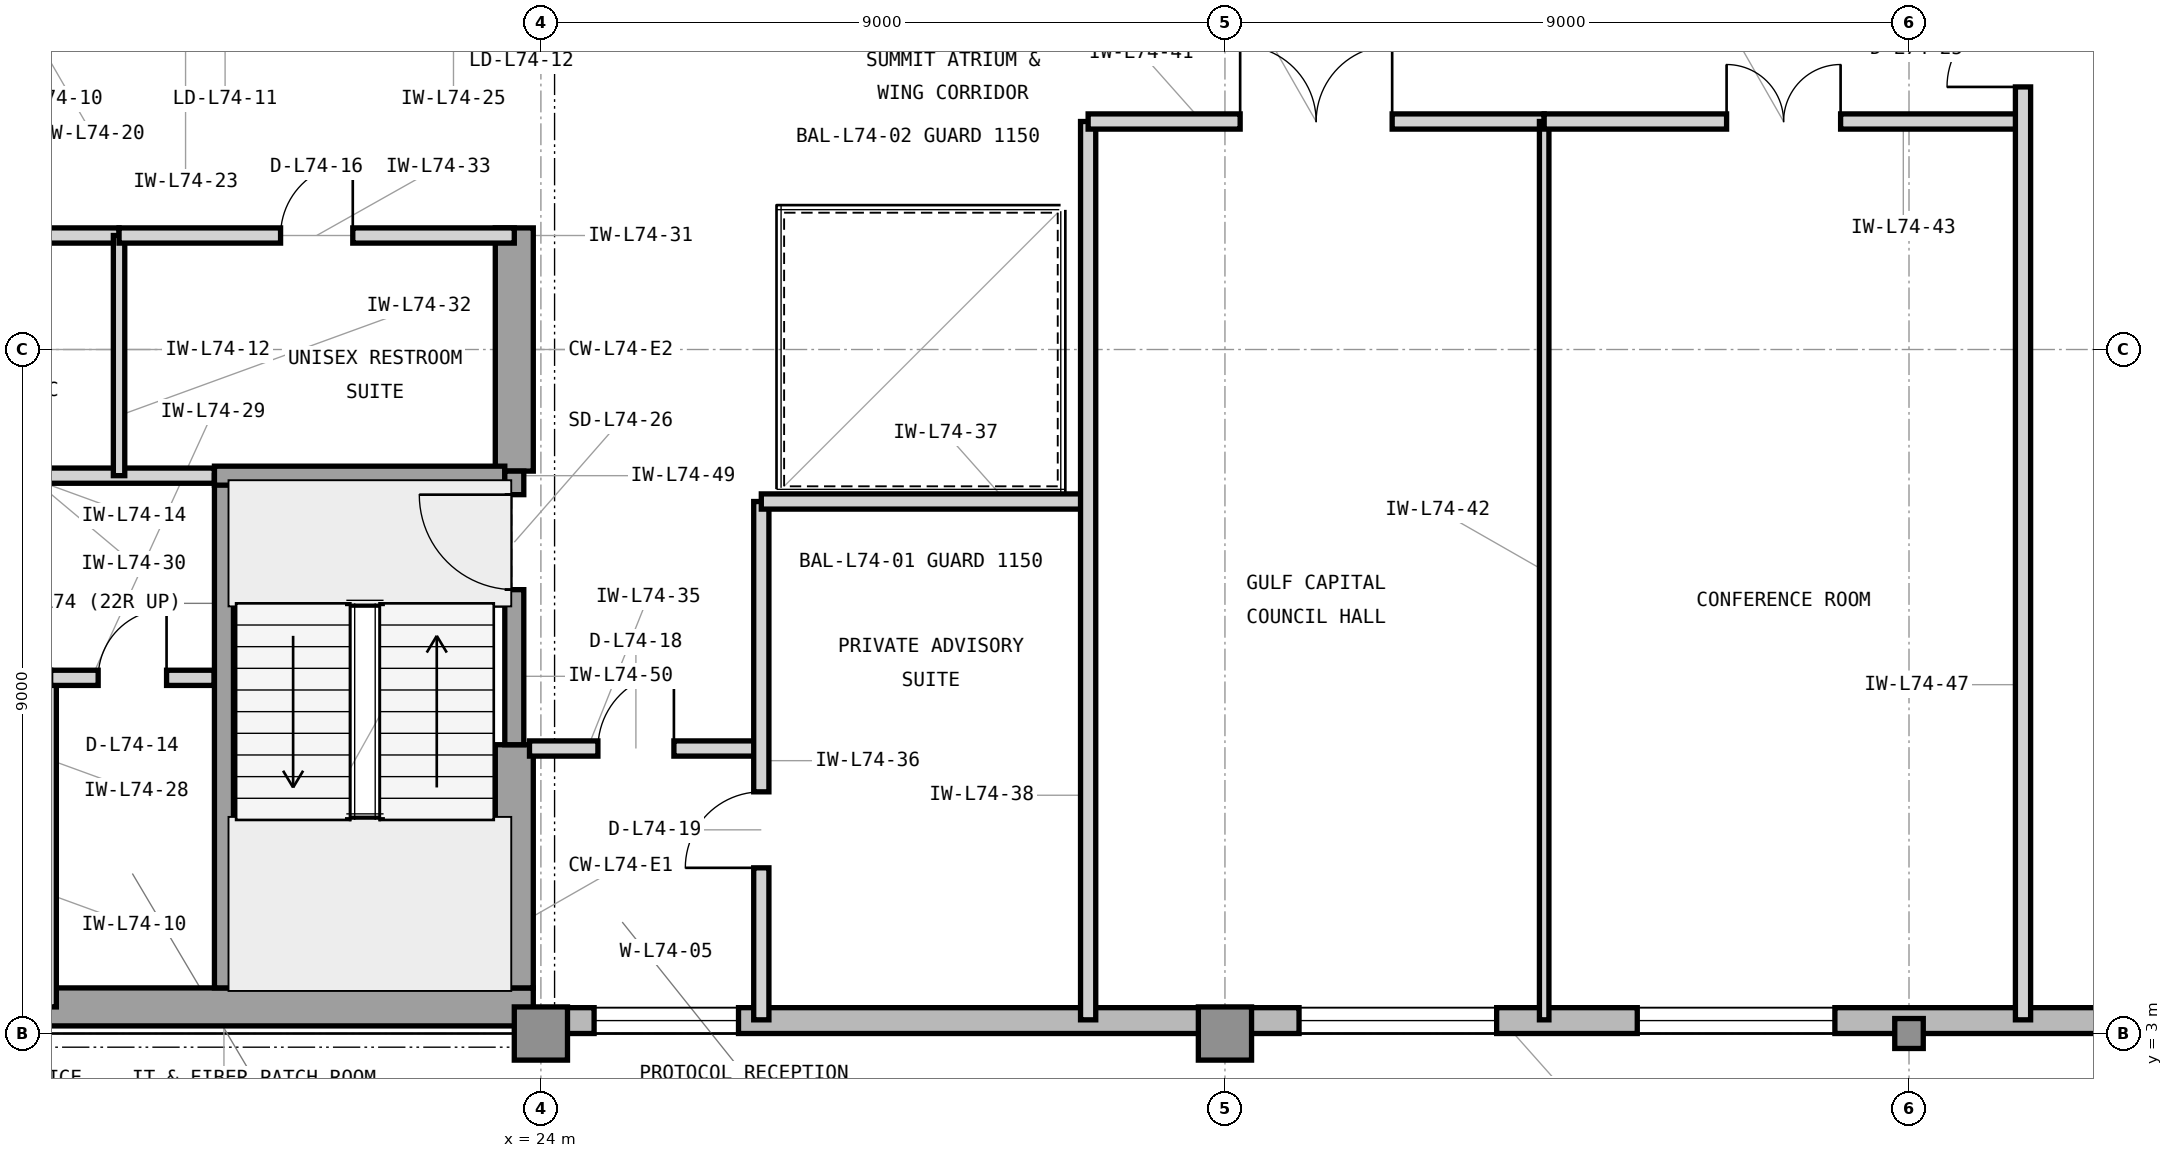
"""IFC4 building model, lengths in metres.
Left out: names, types, materials, properties, quantities, classifications, styles, units other than length and angle.
Written with IfcOpenShell. Run it as: python <this file> out.ifc"""

import sys

from ifc_helpers import new_model, si_unit, direction, frame, frame_2d, origin, origin_2d, place, context, subcontext, project, spatial, rectangle, i_section, extrude, element, fill, save


model = new_model("IFC4")
c1 = context("Model", 3, precision=1e-05, world=origin(), true_north=direction((0.0, 1.0)))
c2 = subcontext(c1, "Body", "Model", "MODEL_VIEW")
j1 = project(units=[si_unit("LENGTHUNIT", "METRE"), si_unit("PLANEANGLEUNIT", "RADIAN")], contexts=[c1])
p1 = place(None, origin())
s1 = spatial("IfcSite", under=j1, at=p1, CompositionType="ELEMENT")
p2 = place(p1, origin())
s2 = spatial("IfcBuilding", under=s1, at=p2, CompositionType="ELEMENT")
p3 = place(p2, frame((0.0, 0.0, 301.5)))
s3 = spatial("IfcBuildingStorey", under=s2, at=p3, CompositionType="ELEMENT", Elevation=301.5)
p4 = place(p3, frame((7.475, 3.35, 0.0), z_axis=(0.0, 0.0, 1.0), x_axis=(1.0, 0.0, 0.0)))
e1 = element("IfcWall", 1, at=p4, inside=s3, PredefinedType="SHEAR", context=c2, shape_type="SweptSolid", body=[
    extrude(rectangle(XDim=16.425, YDim=0.5, at=frame_2d((8.212, 0.0))), origin(), (0.0, 0.0, 1.0), 3.9),
])
p5 = place(p3, frame((23.65, 3.6, 0.0), z_axis=(0.0, 0.0, 1.0), x_axis=(0.0, 1.0, 0.0)))
e2 = element("IfcWall", 2, at=p5, inside=s3, PredefinedType="SHEAR", context=c2, shape_type="SweptSolid", body=[
    extrude(rectangle(XDim=3.2, YDim=0.5, at=frame_2d((1.6, 0.0))), origin(), (0.0, 0.0, 1.0), 3.9),
])
p6 = place(p3, frame((23.65, 10.4, 0.0), z_axis=(0.0, 0.0, 1.0), x_axis=(0.0, 1.0, 0.0)))
e3 = element("IfcWall", 3, at=p6, inside=s3, PredefinedType="SHEAR", context=c2, shape_type="SweptSolid", body=[
    extrude(rectangle(XDim=3.2, YDim=0.5, at=frame_2d((1.6, 0.0))), origin(), (0.0, 0.0, 1.0), 3.9),
])
for number, where, z_axis, x_axis in (
    (4, (24.0, 3.0, 0.0), (0.0, 0.0, 1.0), (1.0, 0.0, 0.0)),
    (5, (33.0, 3.0, 0.0), (0.0, 0.0, 1.0), (1.0, 0.0, 0.0)),
):
    element("IfcColumn", number, at=place(p3, frame(where, z_axis=z_axis, x_axis=x_axis)), inside=s3, PredefinedType="COLUMN", context=c2, shape_type="SweptSolid", body=[
        extrude(rectangle(XDim=0.7, YDim=0.7, at=origin_2d()), origin(), (0.0, 0.0, 1.0), 3.9),
    ])
p7 = place(p3, frame((42.0, 3.0, 0.0), z_axis=(0.0, 0.0, 1.0), x_axis=(1.0, 0.0, 0.0)))
e6 = element("IfcColumn", 6, at=p7, inside=s3, PredefinedType="COLUMN", context=c2, shape_type="SweptSolid", body=[
    extrude(i_section(OverallWidth=0.394, OverallDepth=0.375, WebThickness=0.017, FlangeThickness=0.028, FilletRadius=0.022, at=origin_2d()), origin(), (0.0, 0.0, 1.0), 3.9),
])
p8 = place(p3, frame((23.9, 3.17, 0.0), z_axis=(0.0, 0.0, 1.0), x_axis=(1.0, 0.0, 0.0)))
e7 = element("IfcWall", 7, at=p8, inside=s3, PredefinedType="STANDARD", context=c2, shape_type="SweptSolid", body=[
    extrude(rectangle(XDim=25.5, YDim=0.34, at=frame_2d((12.75, 0.0))), origin(), (0.0, 0.0, 1.0), 3.715),
])
p9 = place(p8, frame((0.8, 0.0, 0.8)))
e8 = element("IfcOpeningElement", 8, at=p9, cuts=e7, PredefinedType="OPENING", context=c2, shape_type="SweptSolid", body=[
    extrude(rectangle(XDim=1.9, YDim=2.35, at=frame_2d((0.95, 1.175))), frame((0.0, 0.18, 0.0), z_axis=(0.0, -1.0, 0.0), x_axis=(1.0, 0.0, 0.0)), (0.0, 0.0, 1.0), 0.36),
])
p10 = place(p8, frame((10.075, 0.0, 0.8)))
e9 = element("IfcOpeningElement", 9, at=p10, cuts=e7, PredefinedType="OPENING", context=c2, shape_type="SweptSolid", body=[
    extrude(rectangle(XDim=2.6, YDim=2.35, at=frame_2d((1.3, 1.175))), frame((0.0, 0.18, 0.0), z_axis=(0.0, -1.0, 0.0), x_axis=(1.0, 0.0, 0.0)), (0.0, 0.0, 1.0), 0.36),
])
p11 = place(p8, frame((14.525, 0.0, 0.8)))
e10 = element("IfcOpeningElement", 10, at=p11, cuts=e7, PredefinedType="OPENING", context=c2, shape_type="SweptSolid", body=[
    extrude(rectangle(XDim=2.6, YDim=2.35, at=frame_2d((1.3, 1.175))), frame((0.0, 0.18, 0.0), z_axis=(0.0, -1.0, 0.0), x_axis=(1.0, 0.0, 0.0)), (0.0, 0.0, 1.0), 0.36),
])
p12 = place(p3, frame((17.55, 3.35, 0.0), z_axis=(0.0, 0.0, 1.0), x_axis=(0.0, 1.0, 0.0)))
e11 = element("IfcWall", 11, at=p12, inside=s3, PredefinedType="PARTITIONING", context=c2, shape_type="SweptSolid", body=[
    extrude(rectangle(XDim=4.33, YDim=0.15, at=frame_2d((2.165, 0.0))), origin(), (0.0, 0.0, 1.0), 3.705),
])
p13 = place(p3, frame((17.55, 7.68, 0.0), z_axis=(0.0, 0.0, 1.0), x_axis=(1.0, 0.0, 0.0)))
e12 = element("IfcWall", 12, at=p13, inside=s3, PredefinedType="PARTITIONING", context=c2, shape_type="SweptSolid", body=[
    extrude(rectangle(XDim=2.15, YDim=0.2, at=frame_2d((1.075, 0.0))), origin(), (0.0, 0.0, 1.0), 3.705),
])
p14 = place(p13, frame((0.625, 0.0, 0.0)))
e13 = element("IfcOpeningElement", 13, at=p14, cuts=e12, PredefinedType="OPENING", context=c2, shape_type="SweptSolid", body=[
    extrude(rectangle(XDim=0.9, YDim=2.1, at=frame_2d((0.45, 1.05))), frame((0.0, 0.11, 0.0), z_axis=(0.0, -1.0, 0.0), x_axis=(1.0, 0.0, 0.0)), (0.0, 0.0, 1.0), 0.22),
])
p15 = place(p3, frame((14.825, 10.34, 0.0), z_axis=(0.0, 0.0, 1.0), x_axis=(1.0, 0.0, 0.0)))
e14 = element("IfcWall", 14, at=p15, inside=s3, PredefinedType="PARTITIONING", context=c2, shape_type="SweptSolid", body=[
    extrude(rectangle(XDim=4.88, YDim=0.2, at=frame_2d((2.44, 0.0))), origin(), (0.0, 0.0, 1.0), 3.705),
])
p16 = place(p3, frame((14.7, 13.5, 0.0), z_axis=(0.0, 0.0, 1.0), x_axis=(1.0, 0.0, 0.0)))
e15 = element("IfcWall", 15, at=p16, inside=s3, PredefinedType="PARTITIONING", context=c2, shape_type="SweptSolid", body=[
    extrude(rectangle(XDim=3.75, YDim=0.2, at=frame_2d((1.875, 0.0))), origin(), (0.0, 0.0, 1.0), 3.354),
])
p17 = place(p16, frame((1.4, 0.0, 0.0)))
e16 = element("IfcOpeningElement", 16, at=p17, cuts=e15, PredefinedType="OPENING", context=c2, shape_type="SweptSolid", body=[
    extrude(rectangle(XDim=0.95, YDim=2.1, at=frame_2d((0.475, 1.05))), frame((0.0, 0.11, 0.0), z_axis=(0.0, -1.0, 0.0), x_axis=(1.0, 0.0, 0.0)), (0.0, 0.0, 1.0), 0.22),
])
p18 = place(p3, frame((18.45, 10.34, 0.0), z_axis=(0.0, 0.0, 1.0), x_axis=(0.0, 1.0, 0.0)))
e17 = element("IfcWall", 17, at=p18, inside=s3, PredefinedType="PARTITIONING", context=c2, shape_type="SweptSolid", body=[
    extrude(rectangle(XDim=3.16, YDim=0.15, at=frame_2d((1.58, 0.0))), origin(), (0.0, 0.0, 1.0), 3.705),
])
p19 = place(p3, frame((18.45, 13.5, 0.0), z_axis=(0.0, 0.0, 1.0), x_axis=(1.0, 0.0, 0.0)))
e18 = element("IfcWall", 18, at=p19, inside=s3, PredefinedType="PARTITIONING", context=c2, shape_type="SweptSolid", body=[
    extrude(rectangle(XDim=5.2, YDim=0.2, at=frame_2d((2.6, 0.0))), origin(), (0.0, 0.0, 1.0), 3.354),
])
p20 = place(p19, frame((2.125, 0.0, 0.0)))
e19 = element("IfcOpeningElement", 19, at=p20, cuts=e18, PredefinedType="OPENING", context=c2, shape_type="SweptSolid", body=[
    extrude(rectangle(XDim=0.95, YDim=2.1, at=frame_2d((0.475, 1.05))), frame((0.0, 0.11, 0.0), z_axis=(0.0, -1.0, 0.0), x_axis=(1.0, 0.0, 0.0)), (0.0, 0.0, 1.0), 0.22),
])
p21 = place(p3, frame((23.85, 6.75, 0.0), z_axis=(0.0, 0.0, 1.0), x_axis=(1.0, 0.0, 0.0)))
e20 = element("IfcWall", 20, at=p21, inside=s3, PredefinedType="PARTITIONING", context=c2, shape_type="SweptSolid", body=[
    extrude(rectangle(XDim=3.05, YDim=0.2, at=frame_2d((1.525, 0.0))), origin(), (0.0, 0.0, 1.0), 3.705),
])
p22 = place(p21, frame((0.9, 0.0, 0.0)))
e21 = element("IfcOpeningElement", 21, at=p22, cuts=e20, PredefinedType="OPENING", context=c2, shape_type="SweptSolid", body=[
    extrude(rectangle(XDim=1.0, YDim=2.15, at=frame_2d((0.5, 1.075))), frame((0.0, 0.11, 0.0), z_axis=(0.0, -1.0, 0.0), x_axis=(1.0, 0.0, 0.0)), (0.0, 0.0, 1.0), 0.22),
])
p23 = place(p3, frame((26.9, 3.18, 0.0), z_axis=(0.0, 0.0, 1.0), x_axis=(0.0, 1.0, 0.0)))
e22 = element("IfcWall", 22, at=p23, inside=s3, PredefinedType="PARTITIONING", context=c2, shape_type="SweptSolid", body=[
    extrude(rectangle(XDim=6.82, YDim=0.2, at=frame_2d((3.41, 0.0))), origin(), (0.0, 0.0, 1.0), 3.705),
])
p24 = place(p23, frame((2.0, 0.0, 0.0)))
e23 = element("IfcOpeningElement", 23, at=p24, cuts=e22, PredefinedType="OPENING", context=c2, shape_type="SweptSolid", body=[
    extrude(rectangle(XDim=1.0, YDim=2.15, at=frame_2d((0.5, 1.075))), frame((0.0, 0.11, 0.0), z_axis=(0.0, -1.0, 0.0), x_axis=(1.0, 0.0, 0.0)), (0.0, 0.0, 1.0), 0.22),
])
p25 = place(p3, frame((26.9, 10.0, 0.0), z_axis=(0.0, 0.0, 1.0), x_axis=(1.0, 0.0, 0.0)))
e24 = element("IfcWall", 24, at=p25, inside=s3, PredefinedType="PARTITIONING", context=c2, shape_type="SweptSolid", body=[
    extrude(rectangle(XDim=4.3, YDim=0.2, at=frame_2d((2.15, 0.0))), origin(), (0.0, 0.0, 1.0), 3.705),
])
p26 = place(p3, frame((31.2, 3.18, 0.0), z_axis=(0.0, 0.0, 1.0), x_axis=(0.0, 1.0, 0.0)))
e25 = element("IfcWall", 25, at=p26, inside=s3, PredefinedType="PARTITIONING", context=c2, shape_type="SweptSolid", body=[
    extrude(rectangle(XDim=11.82, YDim=0.2, at=frame_2d((5.91, 0.0))), origin(), (0.0, 0.0, 1.0), 3.705),
])
p27 = place(p3, frame((31.2, 15.0, 0.0), z_axis=(0.0, 0.0, 1.0), x_axis=(1.0, 0.0, 0.0)))
e26 = element("IfcWall", 26, at=p27, inside=s3, PredefinedType="PARTITIONING", context=c2, shape_type="SweptSolid", body=[
    extrude(rectangle(XDim=6.0, YDim=0.2, at=frame_2d((3.0, 0.0))), origin(), (0.0, 0.0, 1.0), 3.354),
])
p28 = place(p27, frame((2.0, 0.0, 0.0)))
e27 = element("IfcOpeningElement", 27, at=p28, cuts=e26, PredefinedType="OPENING", context=c2, shape_type="SweptSolid", body=[
    extrude(rectangle(XDim=2.0, YDim=2.5, at=frame_2d((1.0, 1.25))), frame((0.0, 0.11, 0.0), z_axis=(0.0, -1.0, 0.0), x_axis=(1.0, 0.0, 0.0)), (0.0, 0.0, 1.0), 0.22),
])
p29 = place(p3, frame((37.2, 3.18, 0.0), z_axis=(0.0, 0.0, 1.0), x_axis=(0.0, 1.0, 0.0)))
e28 = element("IfcWall", 28, at=p29, inside=s3, PredefinedType="PARTITIONING", context=c2, shape_type="SweptSolid", body=[
    extrude(rectangle(XDim=11.82, YDim=0.125, at=frame_2d((5.91, 0.0))), origin(), (0.0, 0.0, 1.0), 3.705),
])
p30 = place(p3, frame((37.2, 15.0, 0.0), z_axis=(0.0, 0.0, 1.0), x_axis=(1.0, 0.0, 0.0)))
e29 = element("IfcWall", 29, at=p30, inside=s3, PredefinedType="PARTITIONING", context=c2, shape_type="SweptSolid", body=[
    extrude(rectangle(XDim=6.3, YDim=0.2, at=frame_2d((3.15, 0.0))), origin(), (0.0, 0.0, 1.0), 3.354),
])
p31 = place(p30, frame((2.4, 0.0, 0.0)))
e30 = element("IfcOpeningElement", 30, at=p31, cuts=e29, PredefinedType="OPENING", context=c2, shape_type="SweptSolid", body=[
    extrude(rectangle(XDim=1.5, YDim=2.3, at=frame_2d((0.75, 1.15))), frame((0.0, 0.11, 0.0), z_axis=(0.0, -1.0, 0.0), x_axis=(1.0, 0.0, 0.0)), (0.0, 0.0, 1.0), 0.22),
])
p32 = place(p3, frame((43.5, 3.18, 0.0), z_axis=(0.0, 0.0, 1.0), x_axis=(0.0, 1.0, 0.0)))
e31 = element("IfcWall", 31, at=p32, inside=s3, PredefinedType="PARTITIONING", context=c2, shape_type="SweptSolid", body=[
    extrude(rectangle(XDim=17.64, YDim=0.2, at=frame_2d((8.82, 0.0))), origin(), (0.0, 0.0, 1.0), 3.705),
])
p33 = place(p32, frame((12.275, 0.0, 0.0)))
e32 = element("IfcOpeningElement", 32, at=p33, cuts=e31, PredefinedType="OPENING", context=c2, shape_type="SweptSolid", body=[
    extrude(rectangle(XDim=1.0, YDim=2.15, at=frame_2d((0.5, 1.075))), frame((0.0, 0.11, 0.0), z_axis=(0.0, -1.0, 0.0), x_axis=(1.0, 0.0, 0.0)), (0.0, 0.0, 1.0), 0.22),
])
p34 = place(p3, frame((19.83, 3.6, 0.0), z_axis=(0.0, 0.0, 1.0), x_axis=(0.0, 1.0, 0.0)))
e33 = element("IfcWall", 33, at=p34, inside=s3, PredefinedType="SHEAR", context=c2, shape_type="SweptSolid", body=[
    extrude(rectangle(XDim=6.74, YDim=0.25, at=frame_2d((3.37, 0.0))), origin(), (0.0, 0.0, 1.0), 3.9),
])
p35 = place(p3, frame((19.705, 10.34, 0.0), z_axis=(0.0, 0.0, 1.0), x_axis=(1.0, 0.0, 0.0)))
e34 = element("IfcWall", 34, at=p35, inside=s3, PredefinedType="SHEAR", context=c2, shape_type="SweptSolid", body=[
    extrude(rectangle(XDim=3.82, YDim=0.25, at=frame_2d((1.91, 0.0))), origin(), (0.0, 0.0, 1.0), 3.9),
])
p36 = place(p3, frame((23.65, 6.8, 0.0), z_axis=(0.0, 0.0, 1.0), x_axis=(0.0, 1.0, 0.0)))
e35 = element("IfcWall", 35, at=p36, inside=s3, PredefinedType="SHEAR", context=c2, shape_type="SweptSolid", body=[
    extrude(rectangle(XDim=3.6, YDim=0.25, at=frame_2d((1.8, 0.0))), origin(), (0.0, 0.0, 1.0), 3.9),
])
p37 = place(p36, frame((2.04, 0.0, 0.0)))
e36 = element("IfcOpeningElement", 36, at=p37, cuts=e35, PredefinedType="OPENING", context=c2, shape_type="SweptSolid", body=[
    extrude(rectangle(XDim=1.25, YDim=2.2, at=frame_2d((0.625, 1.1))), frame((0.0, 0.135, 0.0), z_axis=(0.0, -1.0, 0.0), x_axis=(1.0, 0.0, 0.0)), (0.0, 0.0, 1.0), 0.27),
])
p38 = place(p14, origin())
e37 = element("IfcDoor", 37, at=p38, inside=s3, OperationType="SINGLE_SWING_RIGHT", PredefinedType="TRAPDOOR", context=c2, shape_type="SweptSolid", body=[
    extrude(rectangle(XDim=0.9, YDim=2.1, at=frame_2d((0.45, 1.05))), frame((0.0, 0.025, 0.0), z_axis=(0.0, -1.0, 0.0), x_axis=(1.0, 0.0, 0.0)), (0.0, 0.0, 1.0), 0.05),
])
fill(e13, e37)
p39 = place(p20, origin())
e38 = element("IfcDoor", 38, at=p39, inside=s3, OperationType="SINGLE_SWING_RIGHT", PredefinedType="DOOR", context=c2, shape_type="SweptSolid", body=[
    extrude(rectangle(XDim=0.95, YDim=2.1, at=frame_2d((0.475, 1.05))), frame((0.0, 0.025, 0.0), z_axis=(0.0, -1.0, 0.0), x_axis=(1.0, 0.0, 0.0)), (0.0, 0.0, 1.0), 0.05),
])
fill(e19, e38)
p40 = place(p22, origin())
e39 = element("IfcDoor", 39, at=p40, inside=s3, OperationType="SINGLE_SWING_RIGHT", PredefinedType="DOOR", context=c2, shape_type="SweptSolid", body=[
    extrude(rectangle(XDim=1.0, YDim=2.15, at=frame_2d((0.5, 1.075))), frame((0.0, 0.025, 0.0), z_axis=(0.0, -1.0, 0.0), x_axis=(1.0, 0.0, 0.0)), (0.0, 0.0, 1.0), 0.05),
])
fill(e21, e39)
p41 = place(p24, origin())
e40 = element("IfcDoor", 40, at=p41, inside=s3, OperationType="SINGLE_SWING_LEFT", PredefinedType="DOOR", context=c2, shape_type="SweptSolid", body=[
    extrude(rectangle(XDim=1.0, YDim=2.15, at=frame_2d((0.5, 1.075))), frame((0.0, 0.025, 0.0), z_axis=(0.0, -1.0, 0.0), x_axis=(1.0, 0.0, 0.0)), (0.0, 0.0, 1.0), 0.05),
])
fill(e23, e40)
p42 = place(p28, origin())
e41 = element("IfcDoor", 41, at=p42, inside=s3, OperationType="DOUBLE_DOOR_SINGLE_SWING", PredefinedType="DOOR", context=c2, shape_type="SweptSolid", body=[
    extrude(rectangle(XDim=2.0, YDim=2.5, at=frame_2d((1.0, 1.25))), frame((0.0, 0.025, 0.0), z_axis=(0.0, -1.0, 0.0), x_axis=(1.0, 0.0, 0.0)), (0.0, 0.0, 1.0), 0.05),
])
fill(e27, e41)
p43 = place(p31, origin())
e42 = element("IfcDoor", 42, at=p43, inside=s3, OperationType="DOUBLE_DOOR_SINGLE_SWING", PredefinedType="DOOR", context=c2, shape_type="SweptSolid", body=[
    extrude(rectangle(XDim=1.5, YDim=2.3, at=frame_2d((0.75, 1.15))), frame((0.0, 0.025, 0.0), z_axis=(0.0, -1.0, 0.0), x_axis=(1.0, 0.0, 0.0)), (0.0, 0.0, 1.0), 0.05),
])
fill(e30, e42)
p44 = place(p33, origin())
e43 = element("IfcDoor", 43, at=p44, inside=s3, OperationType="SINGLE_SWING_LEFT", PredefinedType="DOOR", context=c2, shape_type="SweptSolid", body=[
    extrude(rectangle(XDim=1.0, YDim=2.15, at=frame_2d((0.5, 1.075))), frame((0.0, 0.025, 0.0), z_axis=(0.0, -1.0, 0.0), x_axis=(1.0, 0.0, 0.0)), (0.0, 0.0, 1.0), 0.05),
])
fill(e32, e43)
p45 = place(p37, origin())
e44 = element("IfcDoor", 44, at=p45, inside=s3, OperationType="SINGLE_SWING_RIGHT", PredefinedType="DOOR", context=c2, shape_type="SweptSolid", body=[
    extrude(rectangle(XDim=1.25, YDim=2.2, at=frame_2d((0.625, 1.1))), frame((0.0, 0.025, 0.0), z_axis=(0.0, -1.0, 0.0), x_axis=(1.0, 0.0, 0.0)), (0.0, 0.0, 1.0), 0.05),
])
fill(e36, e44)
p46 = place(p9, origin())
e45 = element("IfcWindow", 45, at=p46, inside=s3, PartitioningType="SINGLE_PANEL", PredefinedType="WINDOW", context=c2, shape_type="SweptSolid", body=[
    extrude(rectangle(XDim=1.9, YDim=2.35, at=frame_2d((0.95, 1.175))), frame((0.0, 0.11, 0.0), z_axis=(0.0, -1.0, 0.0), x_axis=(1.0, 0.0, 0.0)), (0.0, 0.0, 1.0), 0.06),
])
fill(e8, e45)
p47 = place(p10, origin())
e46 = element("IfcWindow", 46, at=p47, inside=s3, PartitioningType="SINGLE_PANEL", PredefinedType="WINDOW", context=c2, shape_type="SweptSolid", body=[
    extrude(rectangle(XDim=2.6, YDim=2.35, at=frame_2d((1.3, 1.175))), frame((0.0, 0.11, 0.0), z_axis=(0.0, -1.0, 0.0), x_axis=(1.0, 0.0, 0.0)), (0.0, 0.0, 1.0), 0.06),
])
fill(e9, e46)
p48 = place(p11, origin())
e47 = element("IfcWindow", 47, at=p48, inside=s3, PartitioningType="SINGLE_PANEL", PredefinedType="WINDOW", context=c2, shape_type="SweptSolid", body=[
    extrude(rectangle(XDim=2.6, YDim=2.35, at=frame_2d((1.3, 1.175))), frame((0.0, 0.11, 0.0), z_axis=(0.0, -1.0, 0.0), x_axis=(1.0, 0.0, 0.0)), (0.0, 0.0, 1.0), 0.06),
])
fill(e10, e47)
save(model, sys.argv[1])
